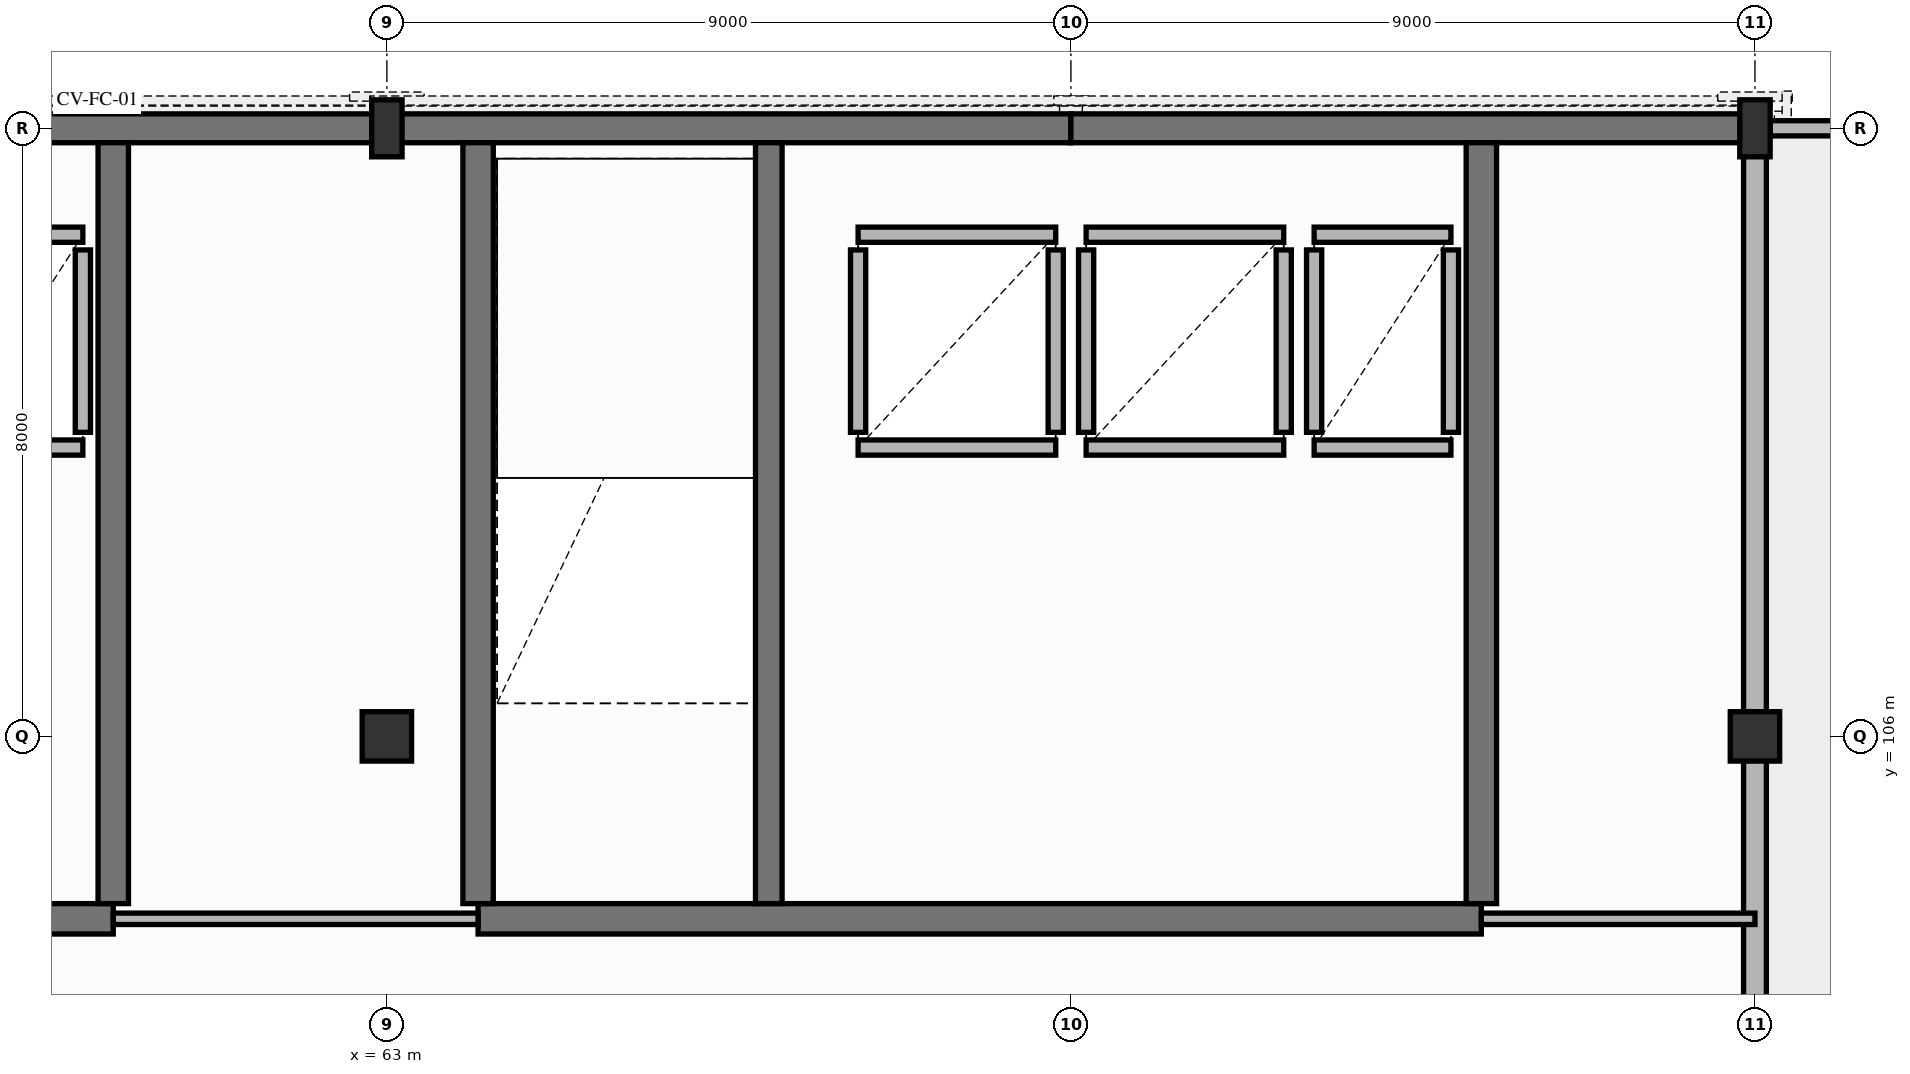
"""IFC4 building model, lengths in metres.
Left out: names, types, materials, properties, quantities, classifications, styles, units other than length and angle.
Written with IfcOpenShell. Run it as: python <this file> out.ifc"""

import sys

from ifc_helpers import new_model, si_unit, direction, frame, frame_2d, origin, origin_2d, place, context, subcontext, project, spatial, rectangle, extrude, element, fill, save


model = new_model("IFC4")
c1 = context("Model", 3, precision=1e-05, world=origin(), true_north=direction((0.0, 1.0)))
c2 = subcontext(c1, "Body", "Model", "MODEL_VIEW")
j1 = project(units=[si_unit("LENGTHUNIT", "METRE"), si_unit("PLANEANGLEUNIT", "RADIAN")], contexts=[c1])
p1 = place(None, origin())
s1 = spatial("IfcSite", under=j1, at=p1, CompositionType="ELEMENT")
p2 = place(p1, origin())
s2 = spatial("IfcBuilding", under=s1, at=p2, CompositionType="ELEMENT")
p3 = place(p2, frame((0.0, 0.0, 16.52)))
s3 = spatial("IfcBuildingStorey", under=s2, at=p3, CompositionType="ELEMENT", Elevation=16.52)
p4 = place(p3, frame((63.0, 106.0, 0.0), z_axis=(0.0, 0.0, 1.0), x_axis=(1.0, 0.0, 0.0)))
e1 = element("IfcColumn", 1, at=p4, inside=s3, PredefinedType="COLUMN", context=c2, shape_type="SweptSolid", body=[
    extrude(rectangle(XDim=0.65, YDim=0.65, at=origin_2d()), origin(), (0.0, 0.0, 1.0), 3.74),
])
p5 = place(p3, frame((63.0, 114.0, 0.0), z_axis=(0.0, 0.0, 1.0), x_axis=(0.0, 1.0, 0.0)))
e2 = element("IfcColumn", 2, at=p5, inside=s3, PredefinedType="COLUMN", context=c2, shape_type="SweptSolid", body=[
    extrude(rectangle(XDim=0.4, YDim=0.75, at=origin_2d()), origin(), (0.0, 0.0, 1.0), 3.74),
])
p6 = place(p3, frame((81.0, 106.0, 0.0), z_axis=(0.0, 0.0, 1.0), x_axis=(1.0, 0.0, 0.0)))
e3 = element("IfcColumn", 3, at=p6, inside=s3, PredefinedType="COLUMN", context=c2, shape_type="SweptSolid", body=[
    extrude(rectangle(XDim=0.65, YDim=0.65, at=origin_2d()), origin(), (0.0, 0.0, 1.0), 3.74),
])
p7 = place(p3, frame((81.0, 114.0, 0.0), z_axis=(0.0, 0.0, 1.0), x_axis=(0.0, 1.0, 0.0)))
e4 = element("IfcColumn", 4, at=p7, inside=s3, PredefinedType="COLUMN", context=c2, shape_type="SweptSolid", body=[
    extrude(rectangle(XDim=0.4, YDim=0.75, at=origin_2d()), origin(), (0.0, 0.0, 1.0), 3.74),
])
for number, where, z_axis, x_axis in (
    (5, (54.0, 114.0, 0.0), (0.0, 0.0, 1.0), (1.0, 0.0, 0.0)),
    (6, (63.0, 114.0, 0.0), (0.0, 0.0, 1.0), (1.0, 0.0, 0.0)),
    (7, (72.0, 114.0, 0.0), (0.0, 0.0, 1.0), (1.0, 0.0, 0.0)),
):
    element("IfcWall", number, at=place(p3, frame(where, z_axis=z_axis, x_axis=x_axis)), inside=s3, PredefinedType="SOLIDWALL", context=c2, shape_type="SweptSolid", body=[
        extrude(rectangle(XDim=9.0, YDim=0.38, at=frame_2d((4.5, 0.0))), origin(), (0.0, 0.0, 1.0), 3.46),
    ])
p8 = place(p3, frame((81.0, 90.0, 0.0), z_axis=(0.0, 0.0, 1.0), x_axis=(0.0, 1.0, 0.0)))
e8 = element("IfcWall", 8, at=p8, inside=s3, PredefinedType="SOLIDWALL", context=c2, shape_type="SweptSolid", body=[
    extrude(rectangle(XDim=24.0, YDim=0.3, at=frame_2d((12.0, 0.0))), origin(), (0.0, 0.0, 1.0), 2.65),
])
p9 = place(p8, frame((3.2, 0.0, 0.43)))
e9 = element("IfcOpeningElement", 9, at=p9, cuts=e8, PredefinedType="OPENING", context=c2, shape_type="SweptSolid", body=[
    extrude(rectangle(XDim=1.5, YDim=2.1, at=frame_2d((0.75, 1.05))), frame((0.0, 0.16, 0.0), z_axis=(0.0, -1.0, 0.0), x_axis=(1.0, 0.0, 0.0)), (0.0, 0.0, 1.0), 0.32),
])
p10 = place(p8, frame((10.5, 0.0, 0.68)))
e10 = element("IfcOpeningElement", 10, at=p10, cuts=e8, PredefinedType="OPENING", context=c2, shape_type="SweptSolid", body=[
    extrude(rectangle(XDim=1.35, YDim=1.85, at=frame_2d((0.675, 0.925))), frame((0.0, 0.16, 0.0), z_axis=(0.0, -1.0, 0.0), x_axis=(1.0, 0.0, 0.0)), (0.0, 0.0, 1.0), 0.32),
])
p11 = place(p3, frame((89.8, 114.0, 0.0), z_axis=(0.0, 0.0, 1.0), x_axis=(-1.0, 0.0, 0.0)))
e11 = element("IfcWall", 11, at=p11, inside=s3, PredefinedType="PARAPET", context=c2, shape_type="SweptSolid", body=[
    extrude(rectangle(XDim=8.6, YDim=0.2, at=frame_2d((4.3, 0.0))), origin(), (0.0, 0.0, 1.0), 0.72),
])
p12 = place(p3, frame((46.2, 103.6, 0.0), z_axis=(0.0, 0.0, 1.0), x_axis=(1.0, 0.0, 0.0)))
e12 = element("IfcWall", 12, at=p12, inside=s3, PredefinedType="SHEAR", context=c2, shape_type="SweptSolid", body=[
    extrude(rectangle(XDim=13.2, YDim=0.4, at=frame_2d((6.6, 0.0))), origin(), (0.0, 0.0, 1.0), 3.46),
])
p13 = place(p12, frame((5.8, 0.0, 0.0)))
e13 = element("IfcOpeningElement", 13, at=p13, cuts=e12, PredefinedType="OPENING", context=c2, shape_type="SweptSolid", body=[
    extrude(rectangle(XDim=1.5, YDim=2.2, at=frame_2d((0.75, 1.1))), frame((0.0, 0.21, 0.0), z_axis=(0.0, -1.0, 0.0), x_axis=(1.0, 0.0, 0.0)), (0.0, 0.0, 1.0), 0.42),
])
p14 = place(p3, frame((59.4, 103.8, 0.0), z_axis=(0.0, 0.0, 1.0), x_axis=(0.0, 1.0, 0.0)))
e14 = element("IfcWall", 14, at=p14, inside=s3, PredefinedType="SHEAR", context=c2, shape_type="SweptSolid", body=[
    extrude(rectangle(XDim=10.01, YDim=0.4, at=frame_2d((5.005, 0.0))), origin(), (0.0, 0.0, 1.0), 3.46),
])
p15 = place(p3, frame((57.2, 109.8, 0.0), z_axis=(0.0, 0.0, 1.0), x_axis=(1.0, 0.0, 0.0)))
e15 = element("IfcWall", 15, at=p15, inside=s3, PredefinedType="PARTITIONING", context=c2, shape_type="SweptSolid", body=[
    extrude(rectangle(XDim=1.8, YDim=0.2, at=frame_2d((0.9, 0.0))), origin(), (0.0, 0.0, 1.0), 3.46),
])
p16 = place(p15, frame((0.45, 0.0, 0.0)))
e16 = element("IfcOpeningElement", 16, at=p16, cuts=e15, PredefinedType="OPENING", context=c2, shape_type="SweptSolid", body=[
    extrude(rectangle(XDim=0.9, YDim=2.1, at=frame_2d((0.45, 1.05))), frame((0.0, 0.11, 0.0), z_axis=(0.0, -1.0, 0.0), x_axis=(1.0, 0.0, 0.0)), (0.0, 0.0, 1.0), 0.22),
])
p17 = place(p3, frame((57.2, 112.6, 0.0), z_axis=(0.0, 0.0, 1.0), x_axis=(1.0, 0.0, 0.0)))
e17 = element("IfcWall", 17, at=p17, inside=s3, PredefinedType="PARTITIONING", context=c2, shape_type="SweptSolid", body=[
    extrude(rectangle(XDim=1.8, YDim=0.2, at=frame_2d((0.9, 0.0))), origin(), (0.0, 0.0, 1.0), 3.46),
])
p18 = place(p3, frame((59.0, 110.0, 0.0), z_axis=(0.0, 0.0, 1.0), x_axis=(0.0, 1.0, 0.0)))
e18 = element("IfcWall", 18, at=p18, inside=s3, PredefinedType="PARTITIONING", context=c2, shape_type="SweptSolid", body=[
    extrude(rectangle(XDim=2.4, YDim=0.2, at=frame_2d((1.2, 0.0))), origin(), (0.0, 0.0, 1.0), 3.46),
])
p19 = place(p3, frame((64.2, 103.6, 0.0), z_axis=(0.0, 0.0, 1.0), x_axis=(1.0, 0.0, 0.0)))
e19 = element("IfcWall", 19, at=p19, inside=s3, PredefinedType="SHEAR", context=c2, shape_type="SweptSolid", body=[
    extrude(rectangle(XDim=13.2, YDim=0.4, at=frame_2d((6.6, 0.0))), origin(), (0.0, 0.0, 1.0), 3.46),
])
p20 = place(p19, frame((5.8, 0.0, 0.0)))
e20 = element("IfcOpeningElement", 20, at=p20, cuts=e19, PredefinedType="OPENING", context=c2, shape_type="SweptSolid", body=[
    extrude(rectangle(XDim=1.5, YDim=2.2, at=frame_2d((0.75, 1.1))), frame((0.0, 0.21, 0.0), z_axis=(0.0, -1.0, 0.0), x_axis=(1.0, 0.0, 0.0)), (0.0, 0.0, 1.0), 0.42),
])
for number, where, z_axis, x_axis in (
    (21, (64.2, 103.8, 0.0), (0.0, 0.0, 1.0), (0.0, 1.0, 0.0)),
    (22, (77.4, 103.8, 0.0), (0.0, 0.0, 1.0), (0.0, 1.0, 0.0)),
):
    element("IfcWall", number, at=place(p3, frame(where, z_axis=z_axis, x_axis=x_axis)), inside=s3, PredefinedType="SHEAR", context=c2, shape_type="SweptSolid", body=[
        extrude(rectangle(XDim=10.01, YDim=0.4, at=frame_2d((5.005, 0.0))), origin(), (0.0, 0.0, 1.0), 3.46),
    ])
p21 = place(p3, frame((68.025, 103.8, 0.0), z_axis=(0.0, 0.0, 1.0), x_axis=(0.0, 1.0, 0.0)))
e23 = element("IfcWall", 23, at=p21, inside=s3, PredefinedType="SHEAR", context=c2, shape_type="SweptSolid", body=[
    extrude(rectangle(XDim=10.01, YDim=0.35, at=frame_2d((5.005, 0.0))), origin(), (0.0, 0.0, 1.0), 3.46),
])
p22 = place(p21, frame((0.45, 0.0, 0.0)))
e24 = element("IfcOpeningElement", 24, at=p22, cuts=e23, PredefinedType="OPENING", context=c2, shape_type="SweptSolid", body=[
    extrude(rectangle(XDim=1.05, YDim=2.2, at=frame_2d((0.525, 1.1))), frame((0.0, 0.185, 0.0), z_axis=(0.0, -1.0, 0.0), x_axis=(1.0, 0.0, 0.0)), (0.0, 0.0, 1.0), 0.37),
])
p23 = place(p3, frame((69.2, 109.8, 0.0), z_axis=(0.0, 0.0, 1.0), x_axis=(1.0, 0.0, 0.0)))
e25 = element("IfcWall", 25, at=p23, inside=s3, PredefinedType="PARTITIONING", context=c2, shape_type="SweptSolid", body=[
    extrude(rectangle(XDim=2.6, YDim=0.2, at=frame_2d((1.3, 0.0))), origin(), (0.0, 0.0, 1.0), 3.46),
])
p24 = place(p23, frame((0.75, 0.0, 0.0)))
e26 = element("IfcOpeningElement", 26, at=p24, cuts=e25, PredefinedType="OPENING", context=c2, shape_type="SweptSolid", body=[
    extrude(rectangle(XDim=1.1, YDim=2.15, at=frame_2d((0.55, 1.075))), frame((0.0, 0.11, 0.0), z_axis=(0.0, -1.0, 0.0), x_axis=(1.0, 0.0, 0.0)), (0.0, 0.0, 1.0), 0.22),
])
p25 = place(p3, frame((69.2, 112.6, 0.0), z_axis=(0.0, 0.0, 1.0), x_axis=(1.0, 0.0, 0.0)))
e27 = element("IfcWall", 27, at=p25, inside=s3, PredefinedType="PARTITIONING", context=c2, shape_type="SweptSolid", body=[
    extrude(rectangle(XDim=2.6, YDim=0.2, at=frame_2d((1.3, 0.0))), origin(), (0.0, 0.0, 1.0), 3.46),
])
for number, where, z_axis, x_axis in (
    (28, (69.2, 110.0, 0.0), (0.0, 0.0, 1.0), (0.0, 1.0, 0.0)),
    (29, (71.8, 110.0, 0.0), (0.0, 0.0, 1.0), (0.0, 1.0, 0.0)),
):
    element("IfcWall", number, at=place(p3, frame(where, z_axis=z_axis, x_axis=x_axis)), inside=s3, PredefinedType="PARTITIONING", context=c2, shape_type="SweptSolid", body=[
        extrude(rectangle(XDim=2.4, YDim=0.2, at=frame_2d((1.2, 0.0))), origin(), (0.0, 0.0, 1.0), 3.46),
    ])
p26 = place(p3, frame((72.2, 109.8, 0.0), z_axis=(0.0, 0.0, 1.0), x_axis=(1.0, 0.0, 0.0)))
e30 = element("IfcWall", 30, at=p26, inside=s3, PredefinedType="PARTITIONING", context=c2, shape_type="SweptSolid", body=[
    extrude(rectangle(XDim=2.6, YDim=0.2, at=frame_2d((1.3, 0.0))), origin(), (0.0, 0.0, 1.0), 3.46),
])
p27 = place(p26, frame((0.75, 0.0, 0.0)))
e31 = element("IfcOpeningElement", 31, at=p27, cuts=e30, PredefinedType="OPENING", context=c2, shape_type="SweptSolid", body=[
    extrude(rectangle(XDim=1.1, YDim=2.15, at=frame_2d((0.55, 1.075))), frame((0.0, 0.11, 0.0), z_axis=(0.0, -1.0, 0.0), x_axis=(1.0, 0.0, 0.0)), (0.0, 0.0, 1.0), 0.22),
])
p28 = place(p3, frame((72.2, 112.6, 0.0), z_axis=(0.0, 0.0, 1.0), x_axis=(1.0, 0.0, 0.0)))
e32 = element("IfcWall", 32, at=p28, inside=s3, PredefinedType="PARTITIONING", context=c2, shape_type="SweptSolid", body=[
    extrude(rectangle(XDim=2.6, YDim=0.2, at=frame_2d((1.3, 0.0))), origin(), (0.0, 0.0, 1.0), 3.46),
])
for number, where, z_axis, x_axis in (
    (33, (72.2, 110.0, 0.0), (0.0, 0.0, 1.0), (0.0, 1.0, 0.0)),
    (34, (74.8, 110.0, 0.0), (0.0, 0.0, 1.0), (0.0, 1.0, 0.0)),
):
    element("IfcWall", number, at=place(p3, frame(where, z_axis=z_axis, x_axis=x_axis)), inside=s3, PredefinedType="PARTITIONING", context=c2, shape_type="SweptSolid", body=[
        extrude(rectangle(XDim=2.4, YDim=0.2, at=frame_2d((1.2, 0.0))), origin(), (0.0, 0.0, 1.0), 3.46),
    ])
p29 = place(p3, frame((75.2, 109.8, 0.0), z_axis=(0.0, 0.0, 1.0), x_axis=(1.0, 0.0, 0.0)))
e35 = element("IfcWall", 35, at=p29, inside=s3, PredefinedType="PARTITIONING", context=c2, shape_type="SweptSolid", body=[
    extrude(rectangle(XDim=1.8, YDim=0.2, at=frame_2d((0.9, 0.0))), origin(), (0.0, 0.0, 1.0), 3.46),
])
p30 = place(p29, frame((0.45, 0.0, 0.0)))
e36 = element("IfcOpeningElement", 36, at=p30, cuts=e35, PredefinedType="OPENING", context=c2, shape_type="SweptSolid", body=[
    extrude(rectangle(XDim=0.9, YDim=2.1, at=frame_2d((0.45, 1.05))), frame((0.0, 0.11, 0.0), z_axis=(0.0, -1.0, 0.0), x_axis=(1.0, 0.0, 0.0)), (0.0, 0.0, 1.0), 0.22),
])
p31 = place(p3, frame((75.2, 112.6, 0.0), z_axis=(0.0, 0.0, 1.0), x_axis=(1.0, 0.0, 0.0)))
e37 = element("IfcWall", 37, at=p31, inside=s3, PredefinedType="PARTITIONING", context=c2, shape_type="SweptSolid", body=[
    extrude(rectangle(XDim=1.8, YDim=0.2, at=frame_2d((0.9, 0.0))), origin(), (0.0, 0.0, 1.0), 3.46),
])
for number, where, z_axis, x_axis in (
    (38, (75.2, 110.0, 0.0), (0.0, 0.0, 1.0), (0.0, 1.0, 0.0)),
    (39, (77.0, 110.0, 0.0), (0.0, 0.0, 1.0), (0.0, 1.0, 0.0)),
):
    element("IfcWall", number, at=place(p3, frame(where, z_axis=z_axis, x_axis=x_axis)), inside=s3, PredefinedType="PARTITIONING", context=c2, shape_type="SweptSolid", body=[
        extrude(rectangle(XDim=2.4, YDim=0.2, at=frame_2d((1.2, 0.0))), origin(), (0.0, 0.0, 1.0), 3.46),
    ])
p32 = place(p3, frame((59.4, 103.6, 0.0), z_axis=(0.0, 0.0, 1.0), x_axis=(1.0, 0.0, 0.0)))
e40 = element("IfcWall", 40, at=p32, inside=s3, PredefinedType="PARTITIONING", context=c2, shape_type="SweptSolid", body=[
    extrude(rectangle(XDim=4.8, YDim=0.15, at=frame_2d((2.4, 0.0))), origin(), (0.0, 0.0, 1.0), 3.46),
])
p33 = place(p32, frame((1.7, 0.0, 0.0)))
e41 = element("IfcOpeningElement", 41, at=p33, cuts=e40, PredefinedType="OPENING", context=c2, shape_type="SweptSolid", body=[
    extrude(rectangle(XDim=1.0, YDim=2.15, at=frame_2d((0.5, 1.075))), frame((0.0, 0.085, 0.0), z_axis=(0.0, -1.0, 0.0), x_axis=(1.0, 0.0, 0.0)), (0.0, 0.0, 1.0), 0.17),
])
p34 = place(p3, frame((77.4, 103.6, 0.0), z_axis=(0.0, 0.0, 1.0), x_axis=(1.0, 0.0, 0.0)))
e42 = element("IfcWall", 42, at=p34, inside=s3, PredefinedType="PARTITIONING", context=c2, shape_type="SweptSolid", body=[
    extrude(rectangle(XDim=3.6, YDim=0.15, at=frame_2d((1.8, 0.0))), origin(), (0.0, 0.0, 1.0), 3.46),
])
p35 = place(p34, frame((1.2, 0.0, 0.0)))
e43 = element("IfcOpeningElement", 43, at=p35, cuts=e42, PredefinedType="OPENING", context=c2, shape_type="SweptSolid", body=[
    extrude(rectangle(XDim=1.0, YDim=2.15, at=frame_2d((0.5, 1.075))), frame((0.0, 0.085, 0.0), z_axis=(0.0, -1.0, 0.0), x_axis=(1.0, 0.0, 0.0)), (0.0, 0.0, 1.0), 0.17),
])
p36 = place(p20, origin())
e44 = element("IfcDoor", 44, at=p36, inside=s3, OperationType="DOUBLE_DOOR_SINGLE_SWING", PredefinedType="DOOR", context=c2, shape_type="SweptSolid", body=[
    extrude(rectangle(XDim=1.5, YDim=2.2, at=frame_2d((0.75, 1.1))), frame((0.0, 0.025, 0.0), z_axis=(0.0, -1.0, 0.0), x_axis=(1.0, 0.0, 0.0)), (0.0, 0.0, 1.0), 0.05),
])
fill(e20, e44)
p37 = place(p22, origin())
e45 = element("IfcDoor", 45, at=p37, inside=s3, OperationType="SINGLE_SWING_LEFT", PredefinedType="DOOR", context=c2, shape_type="SweptSolid", body=[
    extrude(rectangle(XDim=1.05, YDim=2.2, at=frame_2d((0.525, 1.1))), frame((0.0, 0.025, 0.0), z_axis=(0.0, -1.0, 0.0), x_axis=(1.0, 0.0, 0.0)), (0.0, 0.0, 1.0), 0.05),
])
fill(e24, e45)
p38 = place(p24, origin())
e46 = element("IfcDoor", 46, at=p38, inside=s3, OperationType="SLIDING_TO_LEFT", PredefinedType="DOOR", context=c2, shape_type="SweptSolid", body=[
    extrude(rectangle(XDim=1.1, YDim=2.15, at=frame_2d((0.55, 1.075))), frame((0.0, 0.025, 0.0), z_axis=(0.0, -1.0, 0.0), x_axis=(1.0, 0.0, 0.0)), (0.0, 0.0, 1.0), 0.05),
])
fill(e26, e46)
p39 = place(p27, origin())
e47 = element("IfcDoor", 47, at=p39, inside=s3, OperationType="SLIDING_TO_RIGHT", PredefinedType="DOOR", context=c2, shape_type="SweptSolid", body=[
    extrude(rectangle(XDim=1.1, YDim=2.15, at=frame_2d((0.55, 1.075))), frame((0.0, 0.025, 0.0), z_axis=(0.0, -1.0, 0.0), x_axis=(1.0, 0.0, 0.0)), (0.0, 0.0, 1.0), 0.05),
])
fill(e31, e47)
p40 = place(p30, origin())
e48 = element("IfcDoor", 48, at=p40, inside=s3, OperationType="SINGLE_SWING_RIGHT", PredefinedType="DOOR", context=c2, shape_type="SweptSolid", body=[
    extrude(rectangle(XDim=0.9, YDim=2.1, at=frame_2d((0.45, 1.05))), frame((0.0, 0.025, 0.0), z_axis=(0.0, -1.0, 0.0), x_axis=(1.0, 0.0, 0.0)), (0.0, 0.0, 1.0), 0.05),
])
fill(e36, e48)
p41 = place(p33, origin())
e49 = element("IfcDoor", 49, at=p41, inside=s3, OperationType="SINGLE_SWING_LEFT", PredefinedType="DOOR", context=c2, shape_type="SweptSolid", body=[
    extrude(rectangle(XDim=1.0, YDim=2.15, at=frame_2d((0.5, 1.075))), frame((0.0, 0.025, 0.0), z_axis=(0.0, -1.0, 0.0), x_axis=(1.0, 0.0, 0.0)), (0.0, 0.0, 1.0), 0.05),
])
fill(e41, e49)
p42 = place(p35, origin())
e50 = element("IfcDoor", 50, at=p42, inside=s3, OperationType="SINGLE_SWING_RIGHT", PredefinedType="DOOR", context=c2, shape_type="SweptSolid", body=[
    extrude(rectangle(XDim=1.0, YDim=2.15, at=frame_2d((0.5, 1.075))), frame((0.0, 0.025, 0.0), z_axis=(0.0, -1.0, 0.0), x_axis=(1.0, 0.0, 0.0)), (0.0, 0.0, 1.0), 0.05),
])
fill(e43, e50)
save(model, sys.argv[1])
